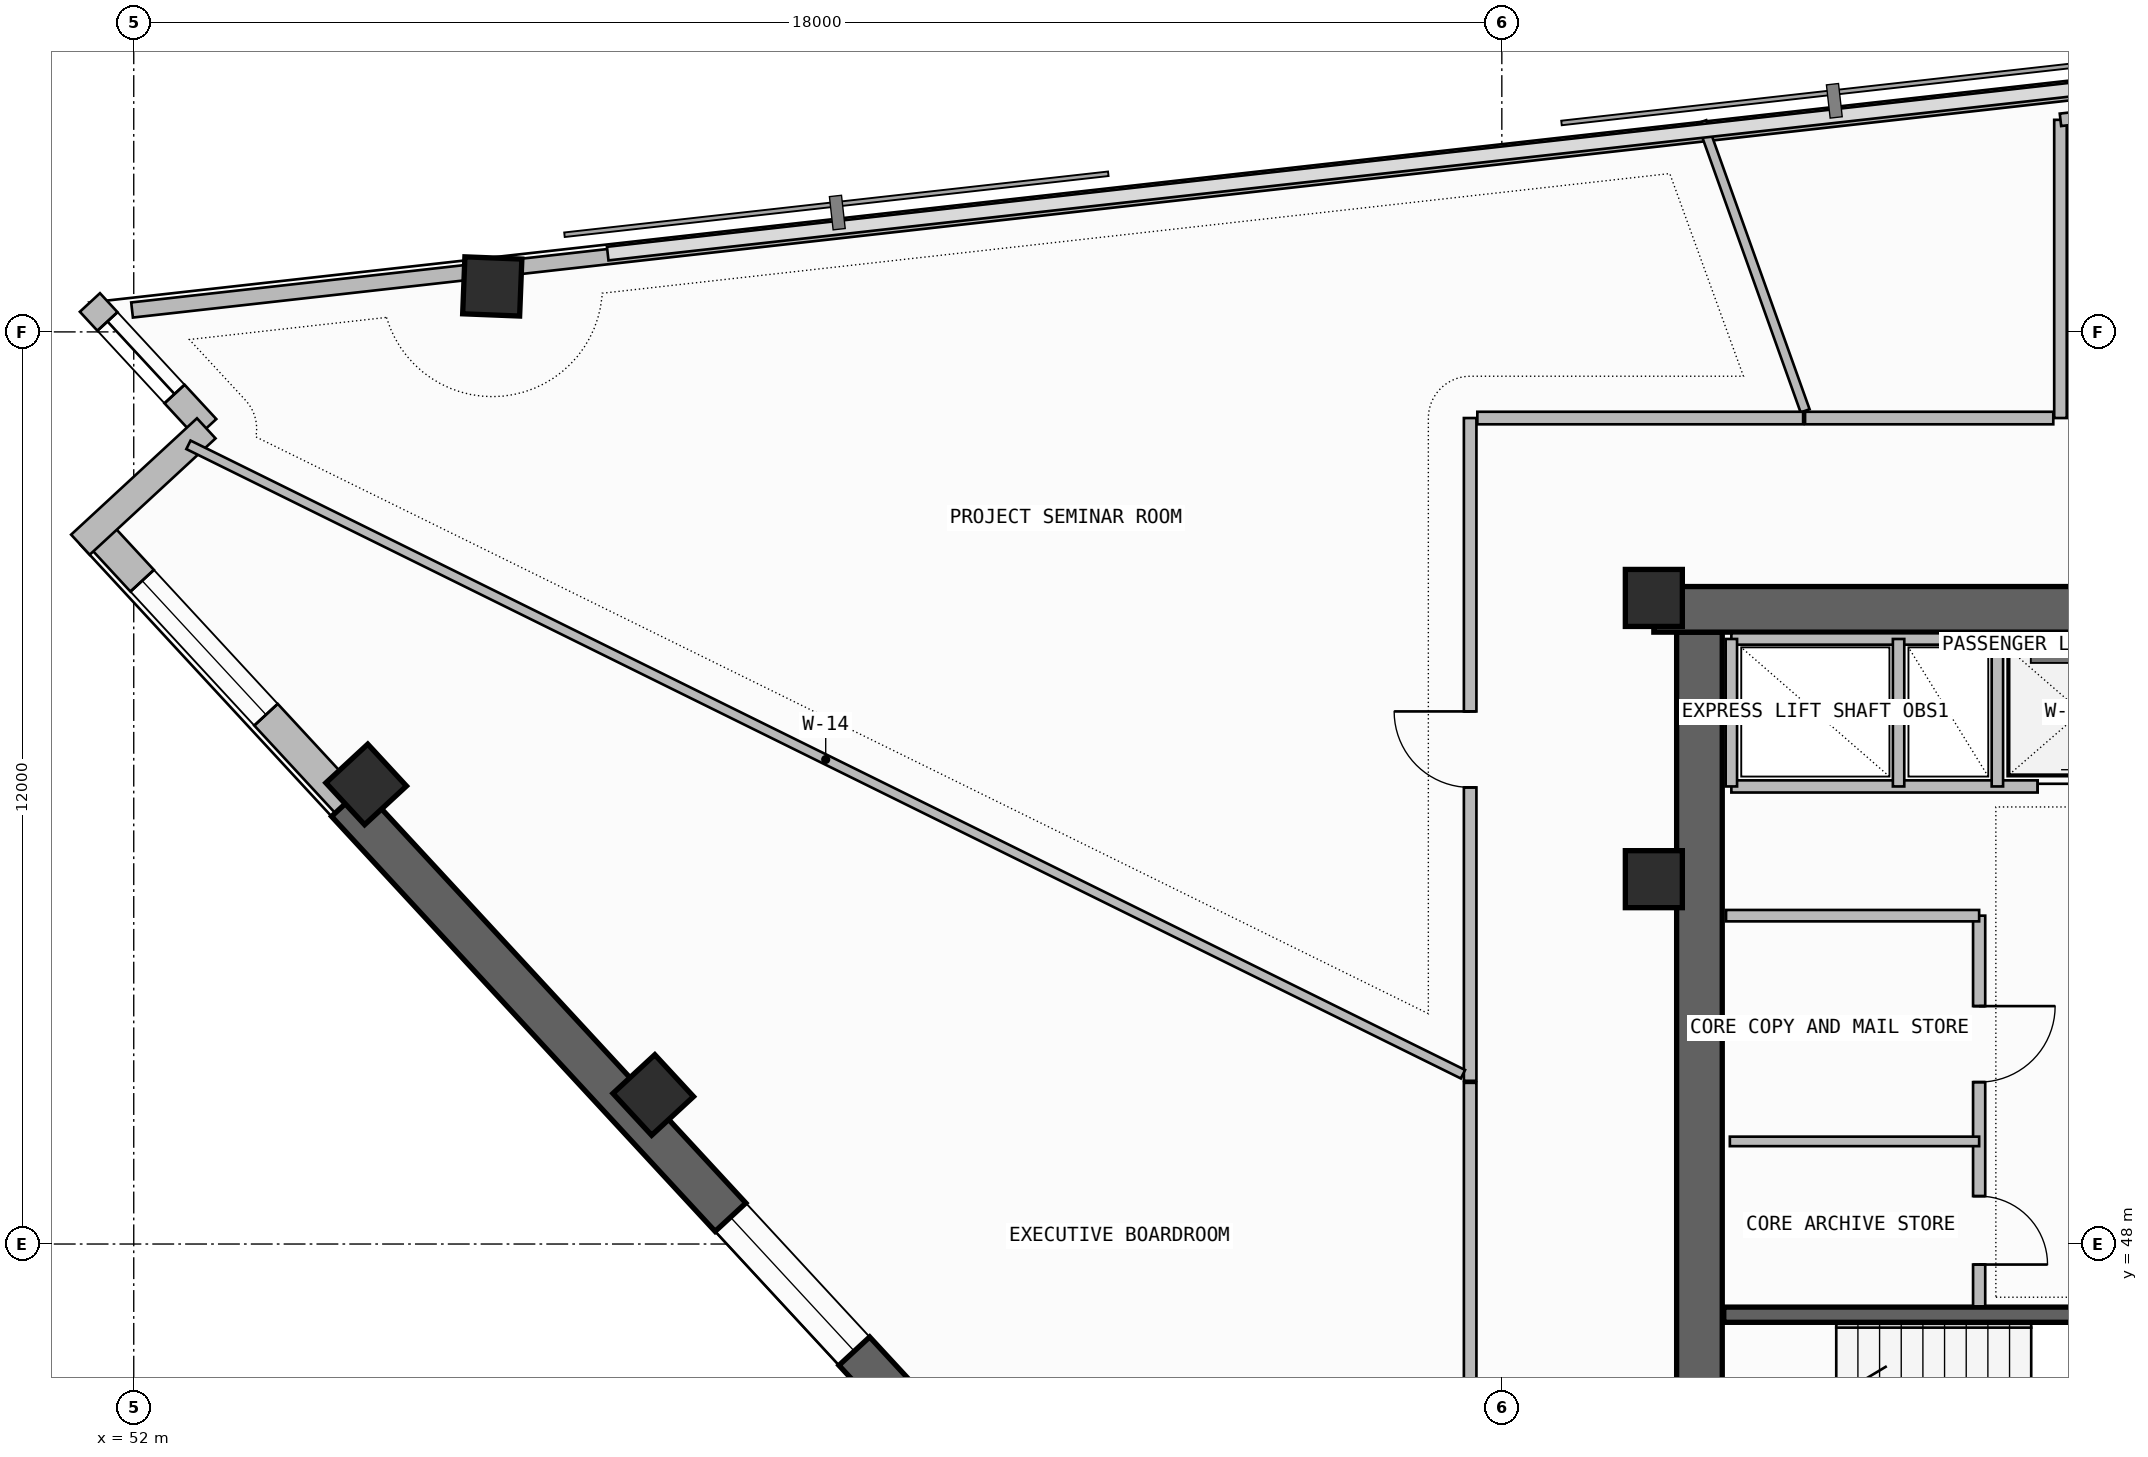
"""IFC4 building model, lengths in metres.
Left out: names, types, materials, properties, quantities, classifications, styles, units other than length and angle.
Written with IfcOpenShell. Run it as: python <this file> out.ifc"""

import sys

from ifc_helpers import new_model, si_unit, direction, frame, frame_2d, origin, origin_2d, place, context, subcontext, project, spatial, rectangle, extrude, element, fill, save


model = new_model("IFC4")
c1 = context("Model", 3, precision=1e-05, world=origin(), true_north=direction((0.0, 1.0)))
c2 = subcontext(c1, "Body", "Model", "MODEL_VIEW")
j1 = project(units=[si_unit("LENGTHUNIT", "METRE"), si_unit("PLANEANGLEUNIT", "RADIAN")], contexts=[c1])
p1 = place(None, origin())
s1 = spatial("IfcSite", under=j1, at=p1, CompositionType="ELEMENT")
p2 = place(p1, origin())
s2 = spatial("IfcBuilding", under=s1, at=p2, CompositionType="ELEMENT")
p3 = place(p2, frame((0.0, 0.0, 267.78)))
s3 = spatial("IfcBuildingStorey", under=s2, at=p3, CompositionType="ELEMENT", Elevation=267.78)
p4 = place(p3, frame((72.6, 43.35, -0.26), z_axis=(0.0, 0.0, 1.0), x_axis=(0.0, 1.0, 0.0)))
e1 = element("IfcWall", 1, at=p4, inside=s3, PredefinedType="SHEAR", context=c2, shape_type="SweptSolid", body=[
    extrude(rectangle(XDim=12.7, YDim=0.6, at=frame_2d((6.35, 0.0))), origin(), (0.0, 0.0, 1.0), 3.52),
])
p5 = place(p4, frame((1.35, 0.0, 0.26)))
e2 = element("IfcOpeningElement", 2, at=p5, cuts=e1, PredefinedType="OPENING", context=c2, shape_type="SweptSolid", body=[
    extrude(rectangle(XDim=1.2, YDim=2.2, at=frame_2d((0.6, 1.1))), frame((0.0, 0.31, 0.0), z_axis=(0.0, -1.0, 0.0), x_axis=(1.0, 0.0, 0.0)), (0.0, 0.0, 1.0), 0.62),
])
p6 = place(p3, frame((72.0, 56.35, -0.26), z_axis=(0.0, 0.0, 1.0), x_axis=(1.0, 0.0, 0.0)))
e3 = element("IfcWall", 3, at=p6, inside=s3, PredefinedType="SHEAR", context=c2, shape_type="SweptSolid", body=[
    extrude(rectangle(XDim=13.6, YDim=0.6, at=frame_2d((6.8, 0.0))), origin(), (0.0, 0.0, 1.0), 3.52),
])
for number, where, z_axis, x_axis in (
    (4, (72.0, 52.8, 0.0), (0.0, 0.0, 1.0), (1.0, 0.0, 0.0)),
    (5, (72.0, 56.5, 0.0), (0.0, 0.0, 1.0), (1.0, 0.0, 0.0)),
    (6, (56.717, 60.598, 0.0), (0.0, 0.0, 1.0), (0.039, 0.999, 0.0)),
    (7, (55.058, 54.046, 0.0), (0.0, 0.0, 1.0), (-0.679, 0.734, 0.0)),
    (8, (58.835, 49.961, 0.0), (0.0, 0.0, 1.0), (-0.679, 0.734, 0.0)),
):
    element("IfcColumn", number, at=place(p3, frame(where, z_axis=z_axis, x_axis=x_axis)), inside=s3, PredefinedType="COLUMN", context=c2, shape_type="SweptSolid", body=[
        extrude(rectangle(XDim=0.75, YDim=0.75, at=origin_2d()), origin(), (0.0, 0.0, 1.0), 3.52),
    ])
p7 = place(p3, frame((51.5, 57.387, 0.0), z_axis=(0.0, 0.0, 1.0), x_axis=(0.67880684669, -0.734316869537, 0.0)))
e9 = element("IfcWall", 9, at=p7, inside=s3, PredefinedType="SOLIDWALL", context=c2, shape_type="SweptSolid", body=[
    extrude(rectangle(XDim=4.869, YDim=0.42, at=frame_2d((2.434, 0.0))), origin(), (0.0, 0.0, 1.0), 2.645),
])
p8 = place(p7, frame((0.9, 0.0, 1.1)))
e10 = element("IfcOpeningElement", 10, at=p8, cuts=e9, PredefinedType="OPENING", context=c2, shape_type="SweptSolid", body=[
    extrude(rectangle(XDim=2.4, YDim=1.2, at=frame_2d((1.2, 0.6))), frame((0.0, 0.22, 0.0), z_axis=(0.0, -1.0, 0.0), x_axis=(1.0, 0.0, 0.0)), (0.0, 0.0, 1.0), 0.44),
])
p9 = place(p3, frame((54.805, 53.812, -0.26), z_axis=(0.0, 0.0, 1.0), x_axis=(0.678803115619, -0.734320318543, 0.0)))
e11 = element("IfcWall", 11, at=p9, inside=s3, PredefinedType="SHEAR", context=c2, shape_type="SweptSolid", body=[
    extrude(rectangle(XDim=18.083, YDim=0.55, at=frame_2d((9.042, 0.0))), origin(), (0.0, 0.0, 1.0), 3.52),
])
p10 = place(p9, frame((7.434, 0.0, 1.1)))
e12 = element("IfcOpeningElement", 12, at=p10, cuts=e11, PredefinedType="OPENING", context=c2, shape_type="SweptSolid", body=[
    extrude(rectangle(XDim=2.4, YDim=1.2, at=frame_2d((1.2, 0.6))), frame((0.0, 0.285, 0.0), z_axis=(0.0, -1.0, 0.0), x_axis=(1.0, 0.0, 0.0)), (0.0, 0.0, 1.0), 0.57),
])
p11 = place(p3, frame((51.423, 60.387, 0.0), z_axis=(0.0, 0.0, 1.0), x_axis=(0.678792531533, -0.734330102294, 0.0)))
e13 = element("IfcWall", 13, at=p11, inside=s3, PredefinedType="SOLIDWALL", context=c2, shape_type="SweptSolid", body=[
    extrude(rectangle(XDim=2.255, YDim=0.36, at=frame_2d((1.127, 0.0))), origin(), (0.0, 0.0, 1.0), 3.26),
])
p12 = place(p11, frame((0.34, 0.0, 0.45)))
e14 = element("IfcOpeningElement", 14, at=p12, cuts=e13, PredefinedType="OPENING", context=c2, shape_type="SweptSolid", body=[
    extrude(rectangle(XDim=1.3, YDim=2.4, at=frame_2d((0.65, 1.2))), frame((0.0, 0.19, 0.0), z_axis=(0.0, -1.0, 0.0), x_axis=(1.0, 0.0, 0.0)), (0.0, 0.0, 1.0), 0.38),
])
p13 = place(p3, frame((52.954, 58.731, 0.0), z_axis=(0.0, 0.0, 1.0), x_axis=(-0.734330102294, -0.678792531533, 0.0)))
e15 = element("IfcWall", 15, at=p13, inside=s3, PredefinedType="SOLIDWALL", context=c2, shape_type="SweptSolid", body=[
    extrude(rectangle(XDim=2.255, YDim=0.36, at=frame_2d((1.127, 0.0))), origin(), (0.0, 0.0, 1.0), 3.26),
])
p14 = place(p3, frame((81.557, 63.604, 0.0), z_axis=(0.0, 0.0, 1.0), x_axis=(-0.993776455024, -0.111392806945, 0.0)))
e16 = element("IfcWall", 16, at=p14, inside=s3, PredefinedType="PARAPET", context=c2, shape_type="SweptSolid", body=[
    extrude(rectangle(XDim=24.891, YDim=0.2, at=frame_2d((12.446, 0.0))), origin(), (0.0, 0.0, 1.0), 1.15),
])
p15 = place(p3, frame((56.565, 60.802, 0.0), z_axis=(0.0, 0.0, 1.0), x_axis=(-0.99377164586, -0.111435702918, 0.0)))
e17 = element("IfcWall", 17, at=p15, inside=s3, PredefinedType="PARAPET", context=c2, shape_type="SweptSolid", body=[
    extrude(rectangle(XDim=4.616, YDim=0.2, at=frame_2d((2.308, 0.0))), origin(), (0.0, 0.0, 1.0), 1.15),
])
p16 = place(p3, frame((72.92, 47.07, -0.26), z_axis=(0.0, 0.0, 1.0), x_axis=(1.0, 0.0, 0.0)))
e18 = element("IfcWall", 18, at=p16, inside=s3, PredefinedType="SOLIDWALL", context=c2, shape_type="SweptSolid", body=[
    extrude(rectangle(XDim=7.7, YDim=0.2, at=frame_2d((3.85, 0.0))), origin(), (0.0, 0.0, 1.0), 3.52),
])
p17 = place(p3, frame((76.28, 47.18, 0.0), z_axis=(0.0, 0.0, 1.0), x_axis=(0.0, 1.0, 0.0)))
e19 = element("IfcWall", 19, at=p17, inside=s3, PredefinedType="SOLIDWALL", context=c2, shape_type="SweptSolid", body=[
    extrude(rectangle(XDim=5.14, YDim=0.16, at=frame_2d((2.57, 0.0))), origin(), (0.0, 0.0, 1.0), 3.26),
])
p18 = place(p17, frame((0.55, 0.0, 0.0)))
e20 = element("IfcOpeningElement", 20, at=p18, cuts=e19, PredefinedType="OPENING", context=c2, shape_type="SweptSolid", body=[
    extrude(rectangle(XDim=0.9, YDim=2.1, at=frame_2d((0.45, 1.05))), frame((0.0, 0.09, 0.0), z_axis=(0.0, -1.0, 0.0), x_axis=(1.0, 0.0, 0.0)), (0.0, 0.0, 1.0), 0.18),
])
p19 = place(p17, frame((2.95, 0.0, 0.0)))
e21 = element("IfcOpeningElement", 21, at=p19, cuts=e19, PredefinedType="OPENING", context=c2, shape_type="SweptSolid", body=[
    extrude(rectangle(XDim=1.0, YDim=2.2, at=frame_2d((0.5, 1.1))), frame((0.0, 0.09, 0.0), z_axis=(0.0, -1.0, 0.0), x_axis=(1.0, 0.0, 0.0)), (0.0, 0.0, 1.0), 0.18),
])
p20 = place(p3, frame((72.95, 52.32, 0.0), z_axis=(0.0, 0.0, 1.0), x_axis=(1.0, 0.0, 0.0)))
e22 = element("IfcWall", 22, at=p20, inside=s3, PredefinedType="SOLIDWALL", context=c2, shape_type="SweptSolid", body=[
    extrude(rectangle(XDim=3.33, YDim=0.15, at=frame_2d((1.665, 0.0))), origin(), (0.0, 0.0, 1.0), 3.26),
])
p21 = place(p3, frame((73.0, 49.35, 0.0), z_axis=(0.0, 0.0, 1.0), x_axis=(1.0, 0.0, 0.0)))
e23 = element("IfcWall", 23, at=p21, inside=s3, PredefinedType="PARTITIONING", context=c2, shape_type="SweptSolid", body=[
    extrude(rectangle(XDim=3.28, YDim=0.125, at=frame_2d((1.64, 0.0))), origin(), (0.0, 0.0, 1.0), 3.26),
])
p22 = place(p3, frame((73.02, 54.02, 0.0), z_axis=(0.0, 0.0, 1.0), x_axis=(1.0, 0.0, 0.0)))
e24 = element("IfcWall", 24, at=p22, inside=s3, PredefinedType="SOLIDWALL", context=c2, shape_type="SweptSolid", body=[
    extrude(rectangle(XDim=12.08, YDim=0.16, at=frame_2d((6.04, 0.0))), origin(), (0.0, 0.0, 1.0), 3.26),
])
p23 = place(p22, frame((4.03, 0.0, 0.0)))
e25 = element("IfcOpeningElement", 25, at=p23, cuts=e24, PredefinedType="OPENING", context=c2, shape_type="SweptSolid", body=[
    extrude(rectangle(XDim=1.1, YDim=2.25, at=frame_2d((0.55, 1.125))), frame((0.0, 0.09, 0.0), z_axis=(0.0, -1.0, 0.0), x_axis=(1.0, 0.0, 0.0)), (0.0, 0.0, 1.0), 0.18),
])
p24 = place(p22, frame((6.28, 0.0, 0.0)))
e26 = element("IfcOpeningElement", 26, at=p24, cuts=e24, PredefinedType="OPENING", context=c2, shape_type="SweptSolid", body=[
    extrude(rectangle(XDim=1.1, YDim=2.25, at=frame_2d((0.55, 1.125))), frame((0.0, 0.09, 0.0), z_axis=(0.0, -1.0, 0.0), x_axis=(1.0, 0.0, 0.0)), (0.0, 0.0, 1.0), 0.18),
])
p25 = place(p22, frame((8.53, 0.0, 0.0)))
e27 = element("IfcOpeningElement", 27, at=p25, cuts=e24, PredefinedType="OPENING", context=c2, shape_type="SweptSolid", body=[
    extrude(rectangle(XDim=1.1, YDim=2.25, at=frame_2d((0.55, 1.125))), frame((0.0, 0.09, 0.0), z_axis=(0.0, -1.0, 0.0), x_axis=(1.0, 0.0, 0.0)), (0.0, 0.0, 1.0), 0.18),
])
p26 = place(p3, frame((73.02, 55.96, 0.0), z_axis=(0.0, 0.0, 1.0), x_axis=(1.0, 0.0, 0.0)))
e28 = element("IfcWall", 28, at=p26, inside=s3, PredefinedType="SOLIDWALL", context=c2, shape_type="SweptSolid", body=[
    extrude(rectangle(XDim=3.5, YDim=0.15, at=frame_2d((1.75, 0.0))), origin(), (0.0, 0.0, 1.0), 3.26),
])
p27 = place(p3, frame((73.02, 54.02, 0.0), z_axis=(0.0, 0.0, 1.0), x_axis=(0.0, 1.0, 0.0)))
e29 = element("IfcWall", 29, at=p27, inside=s3, PredefinedType="PLUMBINGWALL", context=c2, shape_type="SweptSolid", body=[
    extrude(rectangle(XDim=1.94, YDim=0.15, at=frame_2d((0.97, 0.0))), origin(), (0.0, 0.0, 1.0), 3.26),
])
p28 = place(p3, frame((76.52, 54.02, 0.0), z_axis=(0.0, 0.0, 1.0), x_axis=(0.0, 1.0, 0.0)))
e30 = element("IfcWall", 30, at=p28, inside=s3, PredefinedType="SOLIDWALL", context=c2, shape_type="SweptSolid", body=[
    extrude(rectangle(XDim=1.94, YDim=0.15, at=frame_2d((0.97, 0.0))), origin(), (0.0, 0.0, 1.0), 3.26),
])
p29 = place(p3, frame((75.22, 54.02, 0.0), z_axis=(0.0, 0.0, 1.0), x_axis=(0.0, 1.0, 0.0)))
e31 = element("IfcWall", 31, at=p29, inside=s3, PredefinedType="PLUMBINGWALL", context=c2, shape_type="SweptSolid", body=[
    extrude(rectangle(XDim=1.94, YDim=0.15, at=frame_2d((0.97, 0.0))), origin(), (0.0, 0.0, 1.0), 3.26),
])
p30 = place(p3, frame((76.52, 55.96, 0.0), z_axis=(0.0, 0.0, 1.0), x_axis=(1.0, 0.0, 0.0)))
e32 = element("IfcWall", 32, at=p30, inside=s3, PredefinedType="SOLIDWALL", context=c2, shape_type="SweptSolid", body=[
    extrude(rectangle(XDim=6.7, YDim=0.15, at=frame_2d((3.35, 0.0))), origin(), (0.0, 0.0, 1.0), 3.26),
])
p31 = place(p3, frame((77.35, 62.79, 0.0), z_axis=(0.0, 0.0, 1.0), x_axis=(0.0, -1.0, 0.0)))
e33 = element("IfcWall", 33, at=p31, inside=s3, PredefinedType="PARTITIONING", context=c2, shape_type="SweptSolid", body=[
    extrude(rectangle(XDim=3.923, YDim=0.165, at=frame_2d((1.962, 0.0))), origin(), (0.0, 0.0, 1.0), 3.26),
])
p32 = place(p3, frame((77.256, 58.867, 0.0), z_axis=(0.0, 0.0, 1.0), x_axis=(-1.0, 0.0, 0.0)))
e34 = element("IfcWall", 34, at=p32, inside=s3, PredefinedType="PARTITIONING", context=c2, shape_type="SweptSolid", body=[
    extrude(rectangle(XDim=3.266, YDim=0.165, at=frame_2d((1.633, 0.0))), origin(), (0.0, 0.0, 1.0), 3.26),
])
p33 = place(p3, frame((79.555, 63.037, 0.0), z_axis=(0.0, 0.0, 1.0), x_axis=(-0.993770518254, -0.11144575833, 0.0)))
e35 = element("IfcWall", 35, at=p33, inside=s3, PredefinedType="PARTITIONING", context=c2, shape_type="SweptSolid", body=[
    extrude(rectangle(XDim=2.219, YDim=0.165, at=frame_2d((1.11, 0.0))), origin(), (0.0, 0.0, 1.0), 3.26),
])
p34 = place(p3, frame((73.99, 58.961, 0.0), z_axis=(0.0, 0.0, 1.0), x_axis=(-0.336520199653, 0.941676247564, 0.0)))
e36 = element("IfcWall", 36, at=p34, inside=s3, PredefinedType="PARTITIONING", context=c2, shape_type="SweptSolid", body=[
    extrude(rectangle(XDim=4.039, YDim=0.125, at=frame_2d((2.02, 0.0))), origin(), (0.0, 0.0, 1.0), 3.26),
])
p35 = place(p3, frame((69.583, 58.867, 0.0), z_axis=(0.0, 0.0, 1.0), x_axis=(0.0, -1.0, 0.0)))
e37 = element("IfcWall", 37, at=p35, inside=s3, PredefinedType="PARTITIONING", context=c2, shape_type="SweptSolid", body=[
    extrude(rectangle(XDim=8.719, YDim=0.165, at=frame_2d((4.36, 0.0))), origin(), (0.0, 0.0, 1.0), 2.745),
])
p36 = place(p35, frame((3.86, 0.0, 0.0)))
e38 = element("IfcOpeningElement", 38, at=p36, cuts=e37, PredefinedType="OPENING", context=c2, shape_type="SweptSolid", body=[
    extrude(rectangle(XDim=1.0, YDim=2.2, at=frame_2d((0.5, 1.1))), frame((0.0, 0.093, 0.0), z_axis=(0.0, -1.0, 0.0), x_axis=(1.0, 0.0, 0.0)), (0.0, 0.0, 1.0), 0.185),
])
p37 = place(p3, frame((73.964, 58.867, 0.0), z_axis=(0.0, 0.0, 1.0), x_axis=(-1.0, 0.0, 0.0)))
e39 = element("IfcWall", 39, at=p37, inside=s3, PredefinedType="PARTITIONING", context=c2, shape_type="SweptSolid", body=[
    extrude(rectangle(XDim=4.286, YDim=0.165, at=frame_2d((2.143, 0.0))), origin(), (0.0, 0.0, 1.0), 3.26),
])
p38 = place(p3, frame((69.489, 50.234, 0.0), z_axis=(0.0, 0.0, 1.0), x_axis=(-0.896640561753, 0.442759193038, 0.0)))
e40 = element("IfcWall", 40, at=p38, inside=s3, PredefinedType="PARTITIONING", context=c2, shape_type="SweptSolid", body=[
    extrude(rectangle(XDim=18.702, YDim=0.125, at=frame_2d((9.351, 0.0))), origin(), (0.0, 0.0, 1.0), 2.645),
])
p39 = place(p3, frame((69.583, 50.12, 0.0), z_axis=(0.0, 0.0, 1.0), x_axis=(0.0, -1.0, 0.0)))
e41 = element("IfcWall", 41, at=p39, inside=s3, PredefinedType="PARTITIONING", context=c2, shape_type="SweptSolid", body=[
    extrude(rectangle(XDim=10.27, YDim=0.165, at=frame_2d((5.135, 0.0))), origin(), (0.0, 0.0, 1.0), 3.26),
])
p40 = place(p39, frame((4.635, 0.0, 0.0)))
e42 = element("IfcOpeningElement", 42, at=p40, cuts=e41, PredefinedType="OPENING", context=c2, shape_type="SweptSolid", body=[
    extrude(rectangle(XDim=1.0, YDim=2.2, at=frame_2d((0.5, 1.1))), frame((0.0, 0.093, 0.0), z_axis=(0.0, -1.0, 0.0), x_axis=(1.0, 0.0, 0.0)), (0.0, 0.0, 1.0), 0.185),
])
p41 = place(p8, origin())
e43 = element("IfcWindow", 43, at=p41, inside=s3, PartitioningType="SINGLE_PANEL", PredefinedType="WINDOW", context=c2, shape_type="SweptSolid", body=[
    extrude(rectangle(XDim=2.4, YDim=1.2, at=frame_2d((1.2, 0.6))), frame((0.0, 0.03, 0.0), z_axis=(0.0, -1.0, 0.0), x_axis=(1.0, 0.0, 0.0)), (0.0, 0.0, 1.0), 0.06),
])
fill(e10, e43)
p42 = place(p10, origin())
e44 = element("IfcWindow", 44, at=p42, inside=s3, PartitioningType="SINGLE_PANEL", PredefinedType="WINDOW", context=c2, shape_type="SweptSolid", body=[
    extrude(rectangle(XDim=2.4, YDim=1.2, at=frame_2d((1.2, 0.6))), frame((0.0, 0.03, 0.0), z_axis=(0.0, -1.0, 0.0), x_axis=(1.0, 0.0, 0.0)), (0.0, 0.0, 1.0), 0.06),
])
fill(e12, e44)
p43 = place(p12, origin())
e45 = element("IfcWindow", 45, at=p43, inside=s3, PartitioningType="SINGLE_PANEL", PredefinedType="WINDOW", context=c2, shape_type="SweptSolid", body=[
    extrude(rectangle(XDim=1.3, YDim=2.4, at=frame_2d((0.65, 1.2))), frame((0.0, 0.03, 0.0), z_axis=(0.0, -1.0, 0.0), x_axis=(1.0, 0.0, 0.0)), (0.0, 0.0, 1.0), 0.06),
])
fill(e14, e45)
p44 = place(p18, frame((0.9, 0.0, 0.0), z_axis=(0.0, 0.0, 1.0), x_axis=(-1.0, 0.0, 0.0)))
e46 = element("IfcDoor", 46, at=p44, inside=s3, OperationType="SINGLE_SWING_RIGHT", PredefinedType="DOOR", context=c2, shape_type="SweptSolid", body=[
    extrude(rectangle(XDim=0.9, YDim=2.1, at=frame_2d((0.45, 1.05))), frame((0.0, 0.025, 0.0), z_axis=(0.0, -1.0, 0.0), x_axis=(1.0, 0.0, 0.0)), (0.0, 0.0, 1.0), 0.05),
])
fill(e20, e46)
p45 = place(p19, frame((1.0, 0.0, 0.0), z_axis=(0.0, 0.0, 1.0), x_axis=(-1.0, 0.0, 0.0)))
e47 = element("IfcDoor", 47, at=p45, inside=s3, OperationType="SINGLE_SWING_LEFT", PredefinedType="DOOR", context=c2, shape_type="SweptSolid", body=[
    extrude(rectangle(XDim=1.0, YDim=2.2, at=frame_2d((0.5, 1.1))), frame((0.0, 0.025, 0.0), z_axis=(0.0, -1.0, 0.0), x_axis=(1.0, 0.0, 0.0)), (0.0, 0.0, 1.0), 0.05),
])
fill(e21, e47)
p46 = place(p23, origin())
e48 = element("IfcDoor", 48, at=p46, inside=s3, OperationType="DOUBLE_DOOR_SLIDING", PredefinedType="DOOR", context=c2, shape_type="SweptSolid", body=[
    extrude(rectangle(XDim=1.1, YDim=2.25, at=frame_2d((0.55, 1.125))), frame((0.0, 0.025, 0.0), z_axis=(0.0, -1.0, 0.0), x_axis=(1.0, 0.0, 0.0)), (0.0, 0.0, 1.0), 0.05),
])
fill(e25, e48)
p47 = place(p36, frame((1.0, 0.0, 0.0), z_axis=(0.0, 0.0, 1.0), x_axis=(-1.0, 0.0, 0.0)))
e49 = element("IfcDoor", 49, at=p47, inside=s3, OperationType="SINGLE_SWING_RIGHT", PredefinedType="DOOR", context=c2, shape_type="SweptSolid", body=[
    extrude(rectangle(XDim=1.0, YDim=2.2, at=frame_2d((0.5, 1.1))), frame((0.0, 0.025, 0.0), z_axis=(0.0, -1.0, 0.0), x_axis=(1.0, 0.0, 0.0)), (0.0, 0.0, 1.0), 0.05),
])
fill(e38, e49)
save(model, sys.argv[1])
